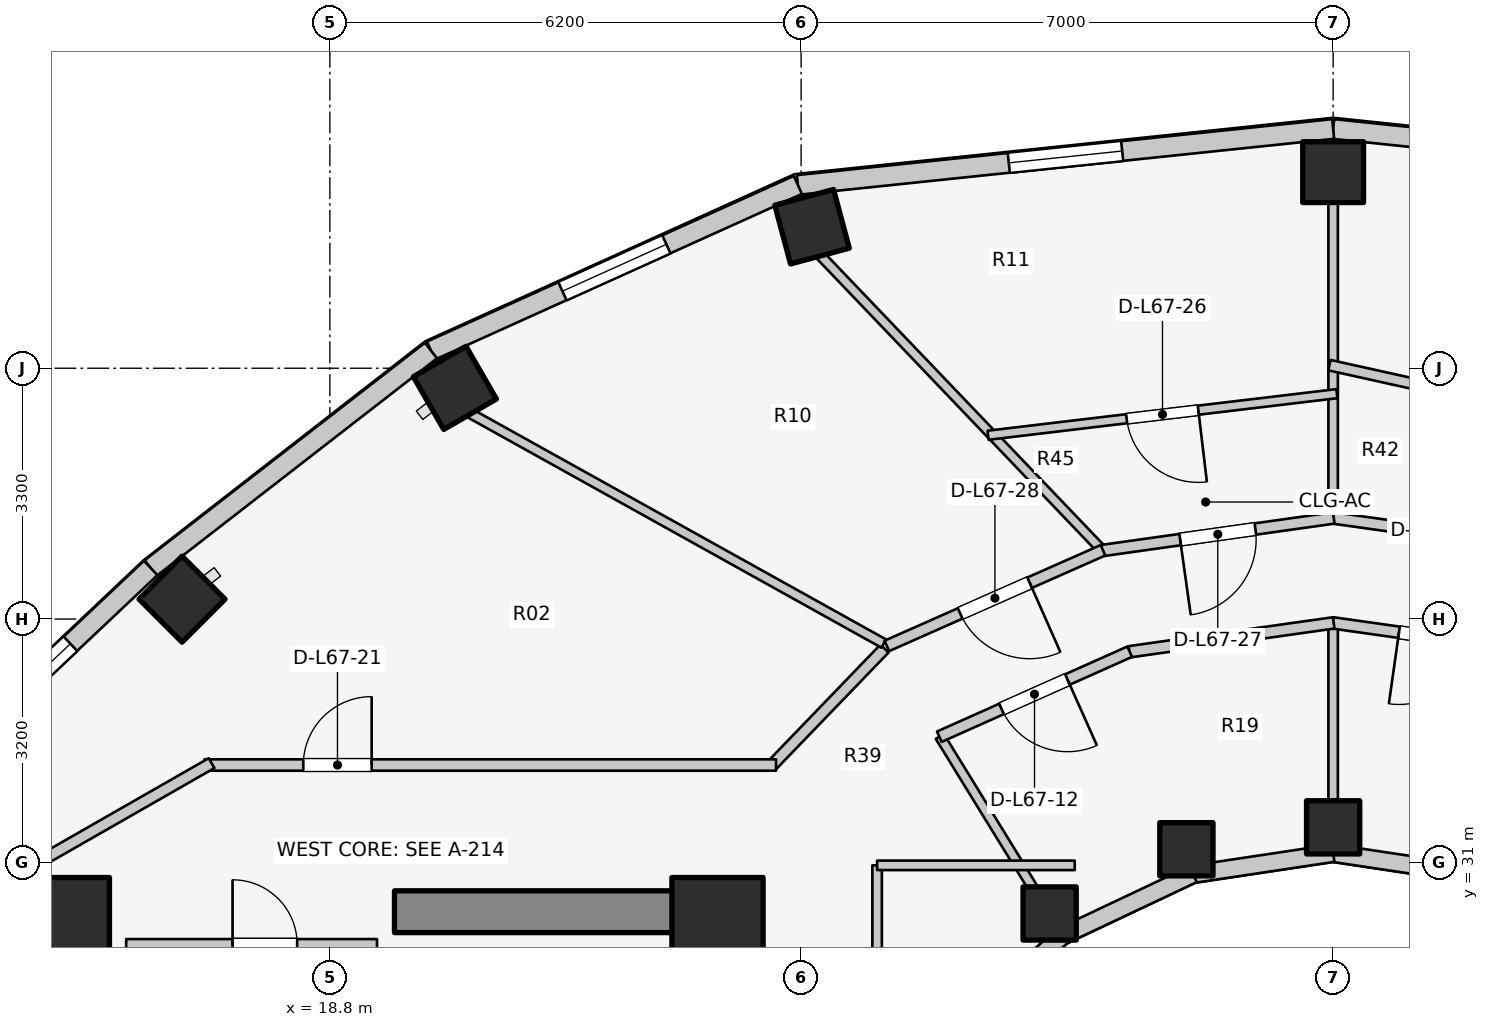
"""IFC4 building model, lengths in metres.
Left out: names, types, materials, properties, quantities, classifications, styles, units other than length and angle.
Written with IfcOpenShell. Run it as: python <this file> out.ifc"""

import sys

from ifc_helpers import new_model, si_unit, direction, frame, frame_2d, origin, origin_2d, place, context, subcontext, project, spatial, rectangle, extrude, element, fill, save


model = new_model("IFC4")
c1 = context("Model", 3, precision=1e-05, world=origin(), true_north=direction((0.0, 1.0)))
c2 = subcontext(c1, "Body", "Model", "MODEL_VIEW")
j1 = project(units=[si_unit("LENGTHUNIT", "METRE"), si_unit("PLANEANGLEUNIT", "RADIAN")], contexts=[c1])
p1 = place(None, origin())
s1 = spatial("IfcSite", under=j1, at=p1, CompositionType="ELEMENT")
p2 = place(p1, origin())
s2 = spatial("IfcBuilding", under=s1, at=p2, CompositionType="ELEMENT")
p3 = place(p2, frame((0.0, 0.0, 220.2)))
s3 = spatial("IfcBuildingStorey", under=s2, at=p3, CompositionType="ELEMENT", Elevation=220.2)
p4 = place(p3, frame((19.65, 30.35, 0.0), z_axis=(0.0, 0.0, 1.0), x_axis=(1.0, 0.0, 0.0)))
e1 = element("IfcWall", 1, at=p4, inside=s3, PredefinedType="SHEAR", context=c2, shape_type="SweptSolid", body=[
    extrude(rectangle(XDim=4.5, YDim=0.55, at=frame_2d((2.25, 0.0))), origin(), (0.0, 0.0, 1.0), 3.1),
])
for number, where, z_axis, x_axis in (
    (2, (23.9, 30.2, 0.0), (0.0, 0.0, 1.0), (1.0, 0.0, 0.0)),
    (3, (15.3, 30.2, 0.0), (0.0, 0.0, 1.0), (1.0, 0.0, 0.0)),
):
    element("IfcColumn", number, at=place(p3, frame(where, z_axis=z_axis, x_axis=x_axis)), inside=s3, PredefinedType="COLUMN", context=c2, shape_type="SweptSolid", body=[
        extrude(rectangle(XDim=1.2, YDim=1.2, at=origin_2d()), origin(), (0.0, 0.0, 1.0), 3.1),
    ])
p5 = place(p3, frame((32.0, 31.46, 0.0), z_axis=(0.0, 0.0, 1.0), x_axis=(1.0, 0.0, 0.0)))
e4 = element("IfcColumn", 4, at=p5, inside=s3, PredefinedType="COLUMN", context=c2, shape_type="SweptSolid", body=[
    extrude(rectangle(XDim=0.7, YDim=0.7, at=origin_2d()), origin(), (0.0, 0.0, 1.0), 3.1),
])
p6 = place(p3, frame((32.0, 40.08, 0.0), z_axis=(0.0, 0.0, 1.0), x_axis=(0.0, 1.0, 0.0)))
e5 = element("IfcColumn", 5, at=p6, inside=s3, PredefinedType="COLUMN", context=c2, shape_type="SweptSolid", body=[
    extrude(rectangle(XDim=0.8, YDim=0.8, at=origin_2d()), origin(), (0.0, 0.0, 1.0), 3.1),
])
p7 = place(p3, frame((30.069, 31.172, 0.0), z_axis=(0.0, 0.0, 1.0), x_axis=(1.0, 0.0, 0.0)))
e6 = element("IfcColumn", 6, at=p7, inside=s3, PredefinedType="COLUMN", context=c2, shape_type="SweptSolid", body=[
    extrude(rectangle(XDim=0.7, YDim=0.7, at=origin_2d()), origin(), (0.0, 0.0, 1.0), 3.1),
])
p8 = place(p3, frame((25.144, 39.362, 0.0), z_axis=(0.0, 0.0, 1.0), x_axis=(-0.258819045103, 0.965925826289, 0.0)))
e7 = element("IfcColumn", 7, at=p8, inside=s3, PredefinedType="COLUMN", context=c2, shape_type="SweptSolid", body=[
    extrude(rectangle(XDim=0.8, YDim=0.8, at=origin_2d()), origin(), (0.0, 0.0, 1.0), 3.1),
])
p9 = place(p3, frame((28.27, 30.327, 0.0), z_axis=(0.0, 0.0, 1.0), x_axis=(1.0, 0.0, 0.0)))
e8 = element("IfcColumn", 8, at=p9, inside=s3, PredefinedType="COLUMN", context=c2, shape_type="SweptSolid", body=[
    extrude(rectangle(XDim=0.7, YDim=0.7, at=origin_2d()), origin(), (0.0, 0.0, 1.0), 3.1),
])
for number, where, z_axis, x_axis in (
    (9, (20.445, 37.241, 0.0), (0.0, 0.0, 1.0), (-0.5, 0.866, 0.0)),
    (10, (16.855, 34.462, 0.0), (0.0, 0.0, 1.0), (-0.707, 0.707, 0.0)),
):
    element("IfcColumn", number, at=place(p3, frame(where, z_axis=z_axis, x_axis=x_axis)), inside=s3, PredefinedType="COLUMN", context=c2, shape_type="SweptSolid", body=[
        extrude(rectangle(XDim=0.8, YDim=0.8, at=origin_2d()), origin(), (0.0, 0.0, 1.0), 3.1),
    ])
for number, where, z_axis, x_axis in (
    (11, (33.843, 30.843, 0.0), (0.0, 0.0, 1.0), (-0.989, 0.149, 0.0)),
    (12, (32.0, 31.12, 0.0), (0.0, 0.0, 1.0), (-0.989, -0.149, 0.0)),
):
    element("IfcWall", number, at=place(p3, frame(where, z_axis=z_axis, x_axis=x_axis)), inside=s3, PredefinedType="STANDARD", context=c2, shape_type="SweptSolid", body=[
        extrude(rectangle(XDim=1.864, YDim=0.23, at=frame_2d((0.932, 0.0))), origin(), (0.0, 0.0, 1.0), 2.16),
    ])
p10 = place(p3, frame((30.157, 30.843, 0.0), z_axis=(0.0, 0.0, 1.0), x_axis=(-0.904179699603, -0.427152280606, 0.0)))
e13 = element("IfcWall", 13, at=p10, inside=s3, PredefinedType="STANDARD", context=c2, shape_type="SweptSolid", body=[
    extrude(rectangle(XDim=1.899, YDim=0.23, at=frame_2d((0.95, 0.0))), origin(), (0.0, 0.0, 1.0), 2.16),
])
p11 = place(p3, frame((28.44, 30.032, 0.0), z_axis=(0.0, 0.0, 1.0), x_axis=(-0.752576694707, -0.658504607869, 0.0)))
e14 = element("IfcWall", 14, at=p11, inside=s3, PredefinedType="STANDARD", context=c2, shape_type="SweptSolid", body=[
    extrude(rectangle(XDim=1.959, YDim=0.23, at=frame_2d((0.98, 0.0))), origin(), (0.0, 0.0, 1.0), 2.16),
])
p12 = place(p3, frame((39.043, 39.912, 0.0), z_axis=(0.0, 0.0, 1.0), x_axis=(-0.994582822721, 0.103947144014, 0.0)))
e15 = element("IfcWall", 15, at=p12, inside=s3, PredefinedType="STANDARD", context=c2, shape_type="SweptSolid", body=[
    extrude(rectangle(XDim=7.081, YDim=0.26, at=frame_2d((3.541, 0.0))), origin(), (0.0, 0.0, 1.0), 2.85),
])
p13 = place(p12, frame((2.341, 0.0, 0.75)))
e16 = element("IfcOpeningElement", 16, at=p13, cuts=e15, PredefinedType="OPENING", context=c2, shape_type="SweptSolid", body=[
    extrude(rectangle(XDim=2.4, YDim=1.7, at=frame_2d((1.2, 0.85))), frame((0.0, 0.14, 0.0), z_axis=(0.0, -1.0, 0.0), x_axis=(1.0, 0.0, 0.0)), (0.0, 0.0, 1.0), 0.28),
])
p14 = place(p3, frame((32.0, 40.648, 0.0), z_axis=(0.0, 0.0, 1.0), x_axis=(-0.994582822721, -0.103947144014, 0.0)))
e17 = element("IfcWall", 17, at=p14, inside=s3, PredefinedType="STANDARD", context=c2, shape_type="SweptSolid", body=[
    extrude(rectangle(XDim=7.081, YDim=0.26, at=frame_2d((3.541, 0.0))), origin(), (0.0, 0.0, 1.0), 2.85),
])
p15 = place(p14, frame((2.791, 0.0, 0.75)))
e18 = element("IfcOpeningElement", 18, at=p15, cuts=e17, PredefinedType="OPENING", context=c2, shape_type="SweptSolid", body=[
    extrude(rectangle(XDim=1.5, YDim=1.6, at=frame_2d((0.75, 0.8))), frame((0.0, 0.14, 0.0), z_axis=(0.0, -1.0, 0.0), x_axis=(1.0, 0.0, 0.0)), (0.0, 0.0, 1.0), 0.28),
])
p16 = place(p3, frame((24.957, 39.912, 0.0), z_axis=(0.0, 0.0, 1.0), x_axis=(-0.911427484938, -0.411460738952, 0.0)))
e19 = element("IfcWall", 19, at=p16, inside=s3, PredefinedType="STANDARD", context=c2, shape_type="SweptSolid", body=[
    extrude(rectangle(XDim=5.296, YDim=0.26, at=frame_2d((2.648, 0.0))), origin(), (0.0, 0.0, 1.0), 2.85),
])
p17 = place(p16, frame((1.898, 0.0, 0.75)))
e20 = element("IfcOpeningElement", 20, at=p17, cuts=e19, PredefinedType="OPENING", context=c2, shape_type="SweptSolid", body=[
    extrude(rectangle(XDim=1.5, YDim=1.6, at=frame_2d((0.75, 0.8))), frame((0.0, 0.14, 0.0), z_axis=(0.0, -1.0, 0.0), x_axis=(1.0, 0.0, 0.0)), (0.0, 0.0, 1.0), 0.28),
])
p18 = place(p3, frame((20.13, 37.733, 0.0), z_axis=(0.0, 0.0, 1.0), x_axis=(-0.790126214723, -0.612944177563, 0.0)))
e21 = element("IfcWall", 21, at=p18, inside=s3, PredefinedType="STANDARD", context=c2, shape_type="SweptSolid", body=[
    extrude(rectangle(XDim=4.667, YDim=0.26, at=frame_2d((2.333, 0.0))), origin(), (0.0, 0.0, 1.0), 2.85),
])
p19 = place(p3, frame((16.442, 34.872, 0.0), z_axis=(0.0, 0.0, 1.0), x_axis=(-0.72731899451, -0.686299555752, 0.0)))
e22 = element("IfcWall", 22, at=p19, inside=s3, PredefinedType="STANDARD", context=c2, shape_type="SweptSolid", body=[
    extrude(rectangle(XDim=4.404, YDim=0.26, at=frame_2d((2.202, 0.0))), origin(), (0.0, 0.0, 1.0), 2.85),
])
p20 = place(p19, frame((1.452, 0.0, 0.75)))
e23 = element("IfcOpeningElement", 23, at=p20, cuts=e22, PredefinedType="OPENING", context=c2, shape_type="SweptSolid", body=[
    extrude(rectangle(XDim=1.5, YDim=1.6, at=frame_2d((0.75, 0.8))), frame((0.0, 0.14, 0.0), z_axis=(0.0, -1.0, 0.0), x_axis=(1.0, 0.0, 0.0)), (0.0, 0.0, 1.0), 0.28),
])
p21 = place(p3, frame((16.12, 29.92, 0.0), z_axis=(0.0, 0.0, 1.0), x_axis=(1.0, 0.0, 0.0)))
e24 = element("IfcWall", 24, at=p21, inside=s3, PredefinedType="PLUMBINGWALL", context=c2, shape_type="SweptSolid", body=[
    extrude(rectangle(XDim=3.3, YDim=0.14, at=frame_2d((1.65, 0.0))), origin(), (0.0, 0.0, 1.0), 2.855),
])
p22 = place(p21, frame((1.399, 0.0, 0.0)))
e25 = element("IfcOpeningElement", 25, at=p22, cuts=e24, PredefinedType="OPENING", context=c2, shape_type="SweptSolid", body=[
    extrude(rectangle(XDim=0.85, YDim=2.05, at=frame_2d((0.425, 1.025))), frame((0.0, 0.08, 0.0), z_axis=(0.0, -1.0, 0.0), x_axis=(1.0, 0.0, 0.0)), (0.0, 0.0, 1.0), 0.16),
])
p23 = place(p3, frame((32.0, 31.1, 0.0), z_axis=(0.0, 0.0, 1.0), x_axis=(0.0, 1.0, 0.0)))
e26 = element("IfcWall", 26, at=p23, inside=s3, PredefinedType="PARTITIONING", context=c2, shape_type="SweptSolid", body=[
    extrude(rectangle(XDim=3.05, YDim=0.125, at=frame_2d((1.525, 0.0))), origin(), (0.0, 0.0, 1.0), 2.376),
])
p24 = place(p3, frame((28.45, 30.015, 0.0), z_axis=(0.0, 0.0, 1.0), x_axis=(-0.523992004803, 0.851723182086, 0.0)))
e27 = element("IfcWall", 27, at=p24, inside=s3, PredefinedType="PARTITIONING", context=c2, shape_type="SweptSolid", body=[
    extrude(rectangle(XDim=3.101, YDim=0.125, at=frame_2d((1.551, 0.0))), origin(), (0.0, 0.0, 1.0), 2.376),
])
p25 = place(p3, frame((34.68, 33.77, 0.0), z_axis=(0.0, 0.0, 1.0), x_axis=(-0.990132151456, 0.140136799779, 0.0)))
e28 = element("IfcWall", 28, at=p25, inside=s3, PredefinedType="PARTITIONING", context=c2, shape_type="SweptSolid", body=[
    extrude(rectangle(XDim=2.714, YDim=0.15, at=frame_2d((1.357, 0.0))), origin(), (0.0, 0.0, 1.0), 2.376),
])
p26 = place(p25, frame((0.882, 0.0, 0.0)))
e29 = element("IfcOpeningElement", 29, at=p26, cuts=e28, PredefinedType="OPENING", context=c2, shape_type="SweptSolid", body=[
    extrude(rectangle(XDim=0.95, YDim=2.1, at=frame_2d((0.475, 1.05))), frame((0.0, 0.085, 0.0), z_axis=(0.0, -1.0, 0.0), x_axis=(1.0, 0.0, 0.0)), (0.0, 0.0, 1.0), 0.17),
])
p27 = place(p3, frame((32.007, 34.15, 0.0), z_axis=(0.0, 0.0, 1.0), x_axis=(-0.990132151456, -0.140136799779, 0.0)))
e30 = element("IfcWall", 30, at=p27, inside=s3, PredefinedType="PARTITIONING", context=c2, shape_type="SweptSolid", body=[
    extrude(rectangle(XDim=2.714, YDim=0.15, at=frame_2d((1.357, 0.0))), origin(), (0.0, 0.0, 1.0), 2.376),
])
p28 = place(p3, frame((29.323, 33.771, 0.0), z_axis=(0.0, 0.0, 1.0), x_axis=(-0.913120130558, -0.407690602257, 0.0)))
e31 = element("IfcWall", 31, at=p28, inside=s3, PredefinedType="PARTITIONING", context=c2, shape_type="SweptSolid", body=[
    extrude(rectangle(XDim=2.743, YDim=0.15, at=frame_2d((1.371, 0.0))), origin(), (0.0, 0.0, 1.0), 2.376),
])
p29 = place(p28, frame((0.896, 0.0, 0.0)))
e32 = element("IfcOpeningElement", 32, at=p29, cuts=e31, PredefinedType="OPENING", context=c2, shape_type="SweptSolid", body=[
    extrude(rectangle(XDim=0.95, YDim=2.1, at=frame_2d((0.475, 1.05))), frame((0.0, 0.085, 0.0), z_axis=(0.0, -1.0, 0.0), x_axis=(1.0, 0.0, 0.0)), (0.0, 0.0, 1.0), 0.17),
])
p30 = place(p3, frame((26.0, 25.8, 0.0), z_axis=(0.0, 0.0, 1.0), x_axis=(0.0, 1.0, 0.0)))
e33 = element("IfcWall", 33, at=p30, inside=s3, PredefinedType="PARTITIONING", context=c2, shape_type="SweptSolid", body=[
    extrude(rectangle(XDim=5.16, YDim=0.125, at=frame_2d((2.58, 0.0))), origin(), (0.0, 0.0, 1.0), 2.232),
])
p31 = place(p3, frame((26.0, 30.96, 0.0), z_axis=(0.0, 0.0, 1.0), x_axis=(1.0, 0.0, 0.0)))
e34 = element("IfcWall", 34, at=p31, inside=s3, PredefinedType="PARTITIONING", context=c2, shape_type="SweptSolid", body=[
    extrude(rectangle(XDim=2.6, YDim=0.125, at=frame_2d((1.3, 0.0))), origin(), (0.0, 0.0, 1.0), 2.376),
])
p32 = place(p3, frame((26.097, 33.812, 0.0), z_axis=(0.0, 0.0, 1.0), x_axis=(-0.694032962553, -0.719943224768, 0.0)))
e35 = element("IfcWall", 35, at=p32, inside=s3, PredefinedType="PARTITIONING", context=c2, shape_type="SweptSolid", body=[
    extrude(rectangle(XDim=2.158, YDim=0.15, at=frame_2d((1.079, 0.0))), origin(), (0.0, 0.0, 1.0), 2.376),
])
p33 = place(p3, frame((17.15, 32.28, 0.0), z_axis=(0.0, 0.0, 1.0), x_axis=(1.0, 0.0, 0.0)))
e36 = element("IfcWall", 36, at=p33, inside=s3, PredefinedType="PARTITIONING", context=c2, shape_type="SweptSolid", body=[
    extrude(rectangle(XDim=7.52, YDim=0.15, at=frame_2d((3.76, 0.0))), origin(), (0.0, 0.0, 1.0), 2.376),
])
p34 = place(p33, frame((1.3, 0.0, 0.0)))
e37 = element("IfcOpeningElement", 37, at=p34, cuts=e36, PredefinedType="OPENING", context=c2, shape_type="SweptSolid", body=[
    extrude(rectangle(XDim=0.9, YDim=2.1, at=frame_2d((0.45, 1.05))), frame((0.0, 0.085, 0.0), z_axis=(0.0, -1.0, 0.0), x_axis=(1.0, 0.0, 0.0)), (0.0, 0.0, 1.0), 0.17),
])
p35 = place(p3, frame((17.243, 32.305, 0.0), z_axis=(0.0, 0.0, 1.0), x_axis=(-0.867991349648, -0.496579315857, 0.0)))
e38 = element("IfcWall", 38, at=p35, inside=s3, PredefinedType="PARTITIONING", context=c2, shape_type="SweptSolid", body=[
    extrude(rectangle(XDim=2.567, YDim=0.15, at=frame_2d((1.283, 0.0))), origin(), (0.0, 0.0, 1.0), 2.22),
])
p36 = place(p3, frame((32.0, 35.585, 0.0), z_axis=(0.0, 0.0, 1.0), x_axis=(0.0, 1.0, 0.0)))
e39 = element("IfcWall", 39, at=p36, inside=s3, PredefinedType="PARTITIONING", context=c2, shape_type="SweptSolid", body=[
    extrude(rectangle(XDim=4.115, YDim=0.125, at=frame_2d((2.058, 0.0))), origin(), (0.0, 0.0, 1.0), 2.376),
])
p37 = place(p3, frame((28.926, 35.143, 0.0), z_axis=(0.0, 0.0, 1.0), x_axis=(-0.691128003726, 0.722732372642, 0.0)))
e40 = element("IfcWall", 40, at=p37, inside=s3, PredefinedType="PARTITIONING", context=c2, shape_type="SweptSolid", body=[
    extrude(rectangle(XDim=5.33, YDim=0.125, at=frame_2d((2.665, 0.0))), origin(), (0.0, 0.0, 1.0), 2.376),
])
p38 = place(p3, frame((26.087, 33.878, 0.0), z_axis=(0.0, 0.0, 1.0), x_axis=(-0.87377679808, 0.486327160599, 0.0)))
e41 = element("IfcWall", 41, at=p38, inside=s3, PredefinedType="PARTITIONING", context=c2, shape_type="SweptSolid", body=[
    extrude(rectangle(XDim=6.24, YDim=0.125, at=frame_2d((3.12, 0.0))), origin(), (0.0, 0.0, 1.0), 2.376),
])
p39 = place(p3, frame((35.085, 35.096, 0.0), z_axis=(0.0, 0.0, 1.0), x_axis=(-0.990254086283, 0.139272555084, 0.0)))
e42 = element("IfcWall", 42, at=p39, inside=s3, PredefinedType="PARTITIONING", context=c2, shape_type="SweptSolid", body=[
    extrude(rectangle(XDim=3.166, YDim=0.15, at=frame_2d((1.583, 0.0))), origin(), (0.0, 0.0, 1.0), 2.376),
])
p40 = place(p3, frame((36.467, 36.538, 0.0), z_axis=(0.0, 0.0, 1.0), x_axis=(-0.976214372251, 0.21680751696, 0.0)))
e43 = element("IfcWall", 43, at=p40, inside=s3, PredefinedType="PLUMBINGWALL", context=c2, shape_type="SweptSolid", body=[
    extrude(rectangle(XDim=4.626, YDim=0.14, at=frame_2d((2.313, 0.0))), origin(), (0.0, 0.0, 1.0), 2.376),
])
p41 = place(p40, frame((1.863, 0.0, 0.0)))
e44 = element("IfcOpeningElement", 44, at=p41, cuts=e43, PredefinedType="OPENING", context=c2, shape_type="SweptSolid", body=[
    extrude(rectangle(XDim=0.9, YDim=2.1, at=frame_2d((0.45, 1.05))), frame((0.0, 0.08, 0.0), z_axis=(0.0, -1.0, 0.0), x_axis=(1.0, 0.0, 0.0)), (0.0, 0.0, 1.0), 0.16),
])
p42 = place(p3, frame((32.05, 37.166, 0.0), z_axis=(0.0, 0.0, 1.0), x_axis=(-0.992963303559, -0.118422454736, 0.0)))
e45 = element("IfcWall", 45, at=p42, inside=s3, PredefinedType="MOVABLE", context=c2, shape_type="SweptSolid", body=[
    extrude(rectangle(XDim=4.622, YDim=0.12, at=frame_2d((2.311, 0.0))), origin(), (0.0, 0.0, 1.0), 2.376),
])
p43 = place(p42, frame((1.836, 0.0, 0.0)))
e46 = element("IfcOpeningElement", 46, at=p43, cuts=e45, PredefinedType="OPENING", context=c2, shape_type="SweptSolid", body=[
    extrude(rectangle(XDim=0.95, YDim=2.1, at=frame_2d((0.475, 1.05))), frame((0.0, 0.07, 0.0), z_axis=(0.0, -1.0, 0.0), x_axis=(1.0, 0.0, 0.0)), (0.0, 0.0, 1.0), 0.14),
])
p44 = place(p3, frame((32.008, 35.53, 0.0), z_axis=(0.0, 0.0, 1.0), x_axis=(-0.990257602807, -0.139247549651, 0.0)))
e47 = element("IfcWall", 47, at=p44, inside=s3, PredefinedType="PARTITIONING", context=c2, shape_type="SweptSolid", body=[
    extrude(rectangle(XDim=3.082, YDim=0.15, at=frame_2d((1.541, 0.0))), origin(), (0.0, 0.0, 1.0), 2.376),
])
p45 = place(p44, frame((1.041, 0.0, 0.0)))
e48 = element("IfcOpeningElement", 48, at=p45, cuts=e47, PredefinedType="OPENING", context=c2, shape_type="SweptSolid", body=[
    extrude(rectangle(XDim=1.0, YDim=2.1, at=frame_2d((0.5, 1.05))), frame((0.0, 0.085, 0.0), z_axis=(0.0, -1.0, 0.0), x_axis=(1.0, 0.0, 0.0)), (0.0, 0.0, 1.0), 0.17),
])
p46 = place(p3, frame((28.972, 35.105, 0.0), z_axis=(0.0, 0.0, 1.0), x_axis=(-0.914490094652, -0.40460828808, 0.0)))
e49 = element("IfcWall", 49, at=p46, inside=s3, PredefinedType="PARTITIONING", context=c2, shape_type="SweptSolid", body=[
    extrude(rectangle(XDim=3.11, YDim=0.15, at=frame_2d((1.555, 0.0))), origin(), (0.0, 0.0, 1.0), 2.376),
])
p47 = place(p46, frame((1.055, 0.0, 0.0)))
e50 = element("IfcOpeningElement", 50, at=p47, cuts=e49, PredefinedType="OPENING", context=c2, shape_type="SweptSolid", body=[
    extrude(rectangle(XDim=1.0, YDim=2.1, at=frame_2d((0.5, 1.05))), frame((0.0, 0.085, 0.0), z_axis=(0.0, -1.0, 0.0), x_axis=(1.0, 0.0, 0.0)), (0.0, 0.0, 1.0), 0.17),
])
p48 = place(p15, origin())
e51 = element("IfcWindow", 51, at=p48, inside=s3, PartitioningType="SINGLE_PANEL", PredefinedType="WINDOW", context=c2, shape_type="SweptSolid", body=[
    extrude(rectangle(XDim=1.5, YDim=1.6, at=frame_2d((0.75, 0.8))), frame((0.0, 0.03, 0.0), z_axis=(0.0, -1.0, 0.0), x_axis=(1.0, 0.0, 0.0)), (0.0, 0.0, 1.0), 0.06),
])
fill(e18, e51)
p49 = place(p17, origin())
e52 = element("IfcWindow", 52, at=p49, inside=s3, PartitioningType="SINGLE_PANEL", PredefinedType="WINDOW", context=c2, shape_type="SweptSolid", body=[
    extrude(rectangle(XDim=1.5, YDim=1.6, at=frame_2d((0.75, 0.8))), frame((0.0, 0.03, 0.0), z_axis=(0.0, -1.0, 0.0), x_axis=(1.0, 0.0, 0.0)), (0.0, 0.0, 1.0), 0.06),
])
fill(e20, e52)
p50 = place(p20, origin())
e53 = element("IfcWindow", 53, at=p50, inside=s3, PartitioningType="SINGLE_PANEL", PredefinedType="WINDOW", context=c2, shape_type="SweptSolid", body=[
    extrude(rectangle(XDim=1.5, YDim=1.6, at=frame_2d((0.75, 0.8))), frame((0.0, 0.03, 0.0), z_axis=(0.0, -1.0, 0.0), x_axis=(1.0, 0.0, 0.0)), (0.0, 0.0, 1.0), 0.06),
])
fill(e23, e53)
p51 = place(p22, origin())
e54 = element("IfcDoor", 54, at=p51, inside=s3, OperationType="SINGLE_SWING_LEFT", PredefinedType="DOOR", context=c2, shape_type="SweptSolid", body=[
    extrude(rectangle(XDim=0.85, YDim=2.05, at=frame_2d((0.425, 1.025))), frame((0.0, 0.025, 0.0), z_axis=(0.0, -1.0, 0.0), x_axis=(1.0, 0.0, 0.0)), (0.0, 0.0, 1.0), 0.05),
])
fill(e25, e54)
p52 = place(p26, origin())
e55 = element("IfcDoor", 55, at=p52, inside=s3, OperationType="SINGLE_SWING_RIGHT", PredefinedType="DOOR", context=c2, shape_type="SweptSolid", body=[
    extrude(rectangle(XDim=0.95, YDim=2.1, at=frame_2d((0.475, 1.05))), frame((0.0, 0.025, 0.0), z_axis=(0.0, -1.0, 0.0), x_axis=(1.0, 0.0, 0.0)), (0.0, 0.0, 1.0), 0.05),
])
fill(e29, e55)
p53 = place(p29, origin())
e56 = element("IfcDoor", 56, at=p53, inside=s3, OperationType="SINGLE_SWING_LEFT", PredefinedType="DOOR", context=c2, shape_type="SweptSolid", body=[
    extrude(rectangle(XDim=0.95, YDim=2.1, at=frame_2d((0.475, 1.05))), frame((0.0, 0.025, 0.0), z_axis=(0.0, -1.0, 0.0), x_axis=(1.0, 0.0, 0.0)), (0.0, 0.0, 1.0), 0.05),
])
fill(e32, e56)
p54 = place(p34, origin())
e57 = element("IfcDoor", 57, at=p54, inside=s3, OperationType="SINGLE_SWING_RIGHT", PredefinedType="DOOR", context=c2, shape_type="SweptSolid", body=[
    extrude(rectangle(XDim=0.9, YDim=2.1, at=frame_2d((0.45, 1.05))), frame((0.0, 0.025, 0.0), z_axis=(0.0, -1.0, 0.0), x_axis=(1.0, 0.0, 0.0)), (0.0, 0.0, 1.0), 0.05),
])
fill(e37, e57)
p55 = place(p43, origin())
e58 = element("IfcDoor", 58, at=p55, inside=s3, OperationType="SINGLE_SWING_LEFT", PredefinedType="DOOR", context=c2, shape_type="SweptSolid", body=[
    extrude(rectangle(XDim=0.95, YDim=2.1, at=frame_2d((0.475, 1.05))), frame((0.0, 0.025, 0.0), z_axis=(0.0, -1.0, 0.0), x_axis=(1.0, 0.0, 0.0)), (0.0, 0.0, 1.0), 0.05),
])
fill(e46, e58)
p56 = place(p45, origin())
e59 = element("IfcDoor", 59, at=p56, inside=s3, OperationType="SINGLE_SWING_RIGHT", PredefinedType="DOOR", context=c2, shape_type="SweptSolid", body=[
    extrude(rectangle(XDim=1.0, YDim=2.1, at=frame_2d((0.5, 1.05))), frame((0.0, 0.025, 0.0), z_axis=(0.0, -1.0, 0.0), x_axis=(1.0, 0.0, 0.0)), (0.0, 0.0, 1.0), 0.05),
])
fill(e48, e59)
p57 = place(p47, origin())
e60 = element("IfcDoor", 60, at=p57, inside=s3, OperationType="SINGLE_SWING_LEFT", PredefinedType="DOOR", context=c2, shape_type="SweptSolid", body=[
    extrude(rectangle(XDim=1.0, YDim=2.1, at=frame_2d((0.5, 1.05))), frame((0.0, 0.025, 0.0), z_axis=(0.0, -1.0, 0.0), x_axis=(1.0, 0.0, 0.0)), (0.0, 0.0, 1.0), 0.05),
])
fill(e50, e60)
save(model, sys.argv[1])
